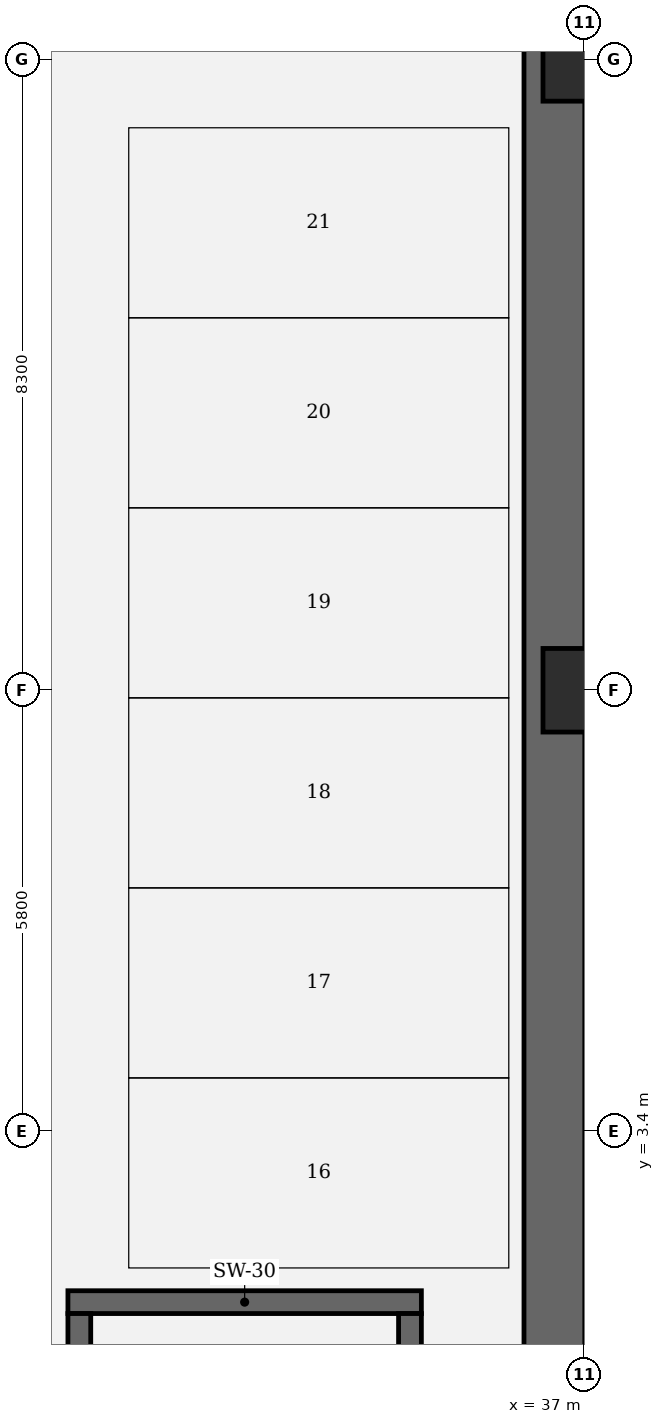
"""IFC4 building model, lengths in metres.
Left out: names, types, materials, properties, quantities, classifications, styles, units other than length and angle.
Written with IfcOpenShell. Run it as: python <this file> out.ifc"""

import sys

from ifc_helpers import new_model, si_unit, direction, frame, frame_2d, origin, origin_2d, place, context, subcontext, project, spatial, rectangle, extrude, element, save


model = new_model("IFC4")
c1 = context("Model", 3, precision=1e-05, world=origin(), true_north=direction((0.0, 1.0)))
c2 = subcontext(c1, "Body", "Model", "MODEL_VIEW")
j1 = project(units=[si_unit("LENGTHUNIT", "METRE"), si_unit("PLANEANGLEUNIT", "RADIAN")], contexts=[c1])
p1 = place(None, origin())
s1 = spatial("IfcSite", under=j1, at=p1, CompositionType="ELEMENT")
p2 = place(p1, origin())
s2 = spatial("IfcBuilding", under=s1, at=p2, CompositionType="ELEMENT")
p3 = place(p2, frame((0.0, 0.0, -4.8)))
s3 = spatial("IfcBuildingStorey", under=s2, at=p3, CompositionType="ELEMENT", Elevation=-4.8)
p4 = place(p3, frame((34.85, 1.15, 0.0), z_axis=(0.0, 0.0, 1.0), x_axis=(-1.0, 0.0, 0.0)))
e1 = element("IfcWall", 1, at=p4, inside=s3, PredefinedType="SOLIDWALL", context=c2, shape_type="SweptSolid", body=[
    extrude(rectangle(XDim=4.65, YDim=0.3, at=frame_2d((2.325, 0.0))), origin(), (0.0, 0.0, 1.0), 4.8),
])
for number, where, z_axis, x_axis in (
    (2, (30.35, -8.8, 0.0), (0.0, 0.0, 1.0), (0.0, 1.0, 0.0)),
    (3, (34.7, 1.0, 0.0), (0.0, 0.0, 1.0), (0.0, -1.0, 0.0)),
):
    element("IfcWall", number, at=place(p3, frame(where, z_axis=z_axis, x_axis=x_axis)), inside=s3, PredefinedType="SOLIDWALL", context=c2, shape_type="SweptSolid", body=[
        extrude(rectangle(XDim=9.8, YDim=0.3, at=frame_2d((4.9, 0.0))), origin(), (0.0, 0.0, 1.0), 4.8),
    ])
for number, where, z_axis, x_axis in (
    (4, (37.0, 9.2, 0.0), (0.0, 0.0, 1.0), (1.0, 0.0, 0.0)),
    (5, (37.0, 17.5, 0.0), (0.0, 0.0, 1.0), (1.0, 0.0, 0.0)),
):
    element("IfcColumn", number, at=place(p3, frame(where, z_axis=z_axis, x_axis=x_axis)), inside=s3, PredefinedType="COLUMN", context=c2, shape_type="SweptSolid", body=[
        extrude(rectangle(XDim=1.1, YDim=1.1, at=origin_2d()), origin(), (0.0, 0.0, 1.0), 4.8),
    ])
p5 = place(p3, frame((36.6, 24.2, 0.0), z_axis=(0.0, 0.0, 1.0), x_axis=(0.0, -1.0, 0.0)))
e6 = element("IfcWall", 6, at=p5, inside=s3, PredefinedType="USERDEFINED", context=c2, shape_type="SweptSolid", body=[
    extrude(rectangle(XDim=48.4, YDim=0.8, at=frame_2d((24.2, 0.0))), origin(), (0.0, 0.0, 1.0), 4.8),
])
save(model, sys.argv[1])
